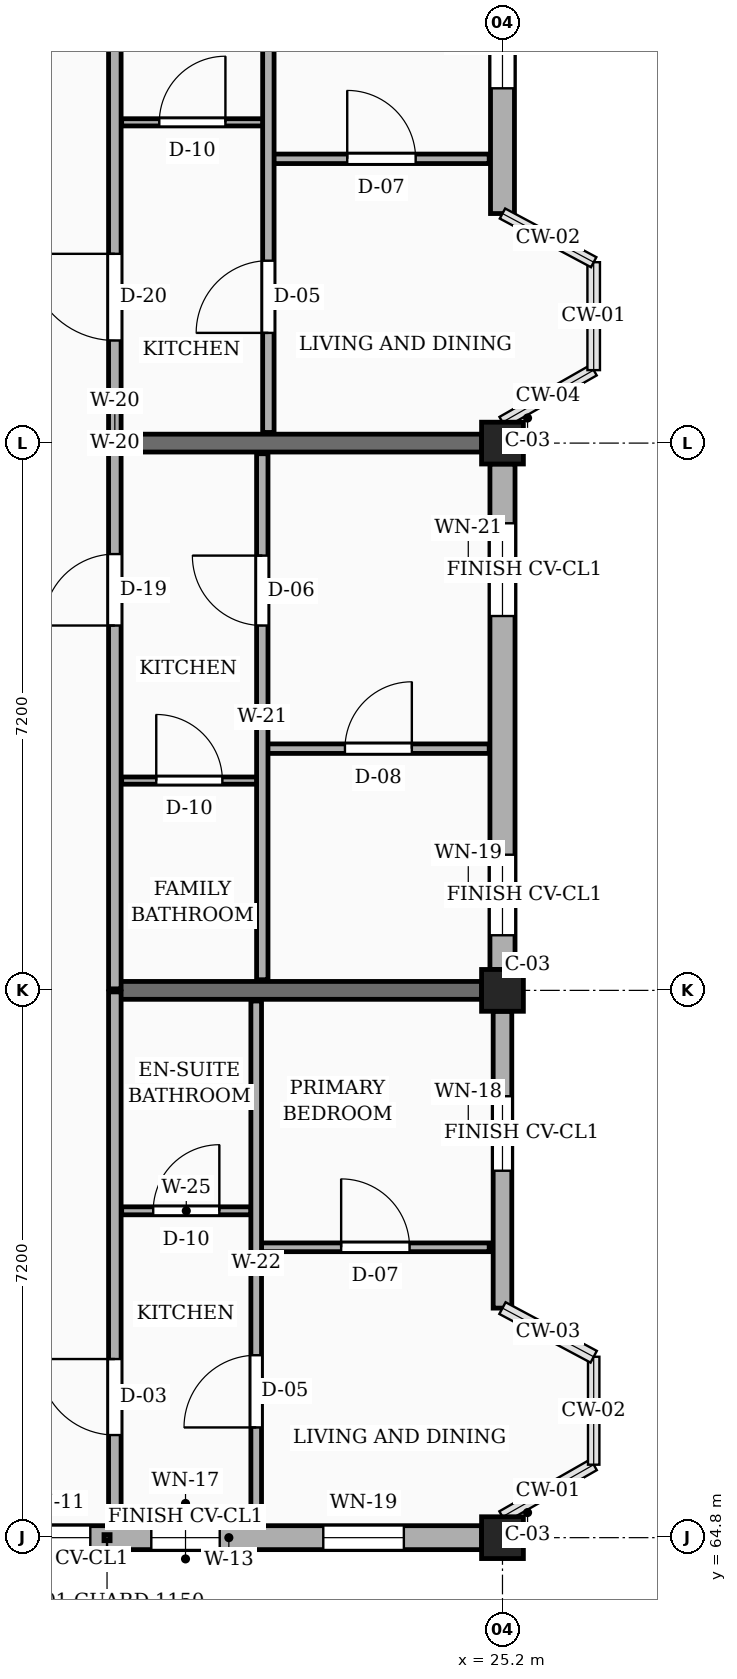
"""IFC4 building model, lengths in metres.
Left out: names, types, materials, properties, quantities, classifications, styles, units other than length and angle.
Written with IfcOpenShell. Run it as: python <this file> out.ifc"""

import sys

from ifc_helpers import new_model, si_unit, direction, frame, frame_2d, origin, origin_2d, place, context, subcontext, project, spatial, rectangle, extrude, element, fill, save


model = new_model("IFC4")
c1 = context("Model", 3, precision=1e-05, world=origin(), true_north=direction((0.0, 1.0)))
c2 = subcontext(c1, "Body", "Model", "MODEL_VIEW")
j1 = project(units=[si_unit("LENGTHUNIT", "METRE"), si_unit("PLANEANGLEUNIT", "RADIAN")], contexts=[c1])
p1 = place(None, origin())
s1 = spatial("IfcSite", under=j1, at=p1, CompositionType="ELEMENT")
p2 = place(p1, origin())
s2 = spatial("IfcBuilding", under=s1, at=p2, CompositionType="ELEMENT")
p3 = place(p2, frame((0.0, 0.0, 20.25)))
s3 = spatial("IfcBuildingStorey", under=s2, at=p3, CompositionType="ELEMENT", Elevation=20.25)
for number, where, z_axis, x_axis in (
    (1, (25.2, 64.8, 0.0), (0.0, 0.0, 1.0), (1.0, 0.0, 0.0)),
    (2, (25.2, 72.0, 0.0), (0.0, 0.0, 1.0), (1.0, 0.0, 0.0)),
    (3, (25.2, 79.2, 0.0), (0.0, 0.0, 1.0), (1.0, 0.0, 0.0)),
):
    element("IfcColumn", number, at=place(p3, frame(where, z_axis=z_axis, x_axis=x_axis)), inside=s3, PredefinedType="COLUMN", context=c2, shape_type="SweptSolid", body=[
        extrude(rectangle(XDim=0.55, YDim=0.55, at=origin_2d()), origin(), (0.0, 0.0, 1.0), 3.15),
    ])
for number, where, z_axis, x_axis in (
    (4, (20.1, 72.0, 0.0), (0.0, 0.0, 1.0), (1.0, 0.0, 0.0)),
    (5, (20.1, 79.2, 0.0), (0.0, 0.0, 1.0), (1.0, 0.0, 0.0)),
):
    element("IfcWall", number, at=place(p3, frame(where, z_axis=z_axis, x_axis=x_axis)), inside=s3, PredefinedType="SOLIDWALL", context=c2, shape_type="SweptSolid", body=[
        extrude(rectangle(XDim=4.825, YDim=0.235, at=frame_2d((2.413, 0.0))), origin(), (0.0, 0.0, 1.0), 2.21),
    ])
p4 = place(p3, frame((18.275, 64.8, 0.0), z_axis=(0.0, 0.0, 1.0), x_axis=(1.0, 0.0, 0.0)))
e6 = element("IfcWall", 6, at=p4, inside=s3, PredefinedType="SOLIDWALL", context=c2, shape_type="SweptSolid", body=[
    extrude(rectangle(XDim=6.65, YDim=0.315, at=frame_2d((3.325, 0.0))), origin(), (0.0, 0.0, 1.0), 2.48),
])
p5 = place(p4, frame((0.462, 0.0, 0.78)))
e7 = element("IfcOpeningElement", 7, at=p5, cuts=e6, PredefinedType="OPENING", context=c2, shape_type="SweptSolid", body=[
    extrude(rectangle(XDim=1.04, YDim=1.26, at=frame_2d((0.52, 0.63))), frame((0.0, 0.167, 0.0), z_axis=(0.0, -1.0, 0.0), x_axis=(1.0, 0.0, 0.0)), (0.0, 0.0, 1.0), 0.335),
])
p6 = place(p4, frame((2.305, 0.0, 0.78)))
e8 = element("IfcOpeningElement", 8, at=p6, cuts=e6, PredefinedType="OPENING", context=c2, shape_type="SweptSolid", body=[
    extrude(rectangle(XDim=0.9, YDim=1.36, at=frame_2d((0.45, 0.68))), frame((0.0, 0.167, 0.0), z_axis=(0.0, -1.0, 0.0), x_axis=(1.0, 0.0, 0.0)), (0.0, 0.0, 1.0), 0.335),
])
p7 = place(p4, frame((4.567, 0.0, 0.78)))
e9 = element("IfcOpeningElement", 9, at=p7, cuts=e6, PredefinedType="OPENING", context=c2, shape_type="SweptSolid", body=[
    extrude(rectangle(XDim=1.06, YDim=1.36, at=frame_2d((0.53, 0.68))), frame((0.0, 0.167, 0.0), z_axis=(0.0, -1.0, 0.0), x_axis=(1.0, 0.0, 0.0)), (0.0, 0.0, 1.0), 0.335),
])
p8 = place(p3, frame((25.2, 67.82, 0.0), z_axis=(0.0, 0.0, 1.0), x_axis=(0.0, 1.0, 0.0)))
e10 = element("IfcWall", 10, at=p8, inside=s3, PredefinedType="SOLIDWALL", context=c2, shape_type="SweptSolid", body=[
    extrude(rectangle(XDim=3.905, YDim=0.245, at=frame_2d((1.953, 0.0))), origin(), (0.0, 0.0, 1.0), 2.48),
])
p9 = place(p8, frame((1.808, 0.0, 0.78)))
e11 = element("IfcOpeningElement", 11, at=p9, cuts=e10, PredefinedType="OPENING", context=c2, shape_type="SweptSolid", body=[
    extrude(rectangle(XDim=0.98, YDim=1.36, at=frame_2d((0.49, 0.68))), frame((0.0, 0.133, 0.0), z_axis=(0.0, -1.0, 0.0), x_axis=(1.0, 0.0, 0.0)), (0.0, 0.0, 1.0), 0.265),
])
p10 = place(p3, frame((25.2, 72.275, 0.0), z_axis=(0.0, 0.0, 1.0), x_axis=(0.0, 1.0, 0.0)))
e12 = element("IfcWall", 12, at=p10, inside=s3, PredefinedType="SOLIDWALL", context=c2, shape_type="SweptSolid", body=[
    extrude(rectangle(XDim=6.65, YDim=0.33, at=frame_2d((3.325, 0.0))), origin(), (0.0, 0.0, 1.0), 2.48),
])
p11 = place(p10, frame((0.45, 0.0, 0.78)))
e13 = element("IfcOpeningElement", 13, at=p11, cuts=e12, PredefinedType="OPENING", context=c2, shape_type="SweptSolid", body=[
    extrude(rectangle(XDim=1.06, YDim=1.36, at=frame_2d((0.53, 0.68))), frame((0.0, 0.175, 0.0), z_axis=(0.0, -1.0, 0.0), x_axis=(1.0, 0.0, 0.0)), (0.0, 0.0, 1.0), 0.35),
])
p12 = place(p10, frame((4.65, 0.0, 0.78)))
e14 = element("IfcOpeningElement", 14, at=p12, cuts=e12, PredefinedType="OPENING", context=c2, shape_type="SweptSolid", body=[
    extrude(rectangle(XDim=1.22, YDim=1.36, at=frame_2d((0.61, 0.68))), frame((0.0, 0.175, 0.0), z_axis=(0.0, -1.0, 0.0), x_axis=(1.0, 0.0, 0.0)), (0.0, 0.0, 1.0), 0.35),
])
p13 = place(p3, frame((25.2, 82.22, 0.0), z_axis=(0.0, 0.0, 1.0), x_axis=(0.0, 1.0, 0.0)))
e15 = element("IfcWall", 15, at=p13, inside=s3, PredefinedType="SOLIDWALL", context=c2, shape_type="SweptSolid", body=[
    extrude(rectangle(XDim=3.905, YDim=0.315, at=frame_2d((1.953, 0.0))), origin(), (0.0, 0.0, 1.0), 2.48),
])
p14 = place(p13, frame((1.647, 0.0, 0.78)))
e16 = element("IfcOpeningElement", 16, at=p14, cuts=e15, PredefinedType="OPENING", context=c2, shape_type="SweptSolid", body=[
    extrude(rectangle(XDim=1.22, YDim=1.36, at=frame_2d((0.61, 0.68))), frame((0.0, 0.167, 0.0), z_axis=(0.0, -1.0, 0.0), x_axis=(1.0, 0.0, 0.0)), (0.0, 0.0, 1.0), 0.335),
])
p15 = place(p3, frame((20.1, 64.975, 0.0), z_axis=(0.0, 0.0, 1.0), x_axis=(0.0, 1.0, 0.0)))
e17 = element("IfcWall", 17, at=p15, inside=s3, PredefinedType="PARTITIONING", context=c2, shape_type="SweptSolid", body=[
    extrude(rectangle(XDim=7.005, YDim=0.165, at=frame_2d((3.502, 0.0))), origin(), (0.0, 0.0, 1.0), 2.345),
])
p16 = place(p15, frame((1.175, 0.0, 0.0)))
e18 = element("IfcOpeningElement", 18, at=p16, cuts=e17, PredefinedType="OPENING", context=c2, shape_type="SweptSolid", body=[
    extrude(rectangle(XDim=1.0, YDim=2.15, at=frame_2d((0.5, 1.075))), frame((0.0, 0.093, 0.0), z_axis=(0.0, -1.0, 0.0), x_axis=(1.0, 0.0, 0.0)), (0.0, 0.0, 1.0), 0.185),
])
p17 = place(p3, frame((20.1, 72.02, 0.0), z_axis=(0.0, 0.0, 1.0), x_axis=(0.0, 1.0, 0.0)))
e19 = element("IfcWall", 19, at=p17, inside=s3, PredefinedType="PARTITIONING", context=c2, shape_type="SweptSolid", body=[
    extrude(rectangle(XDim=7.16, YDim=0.165, at=frame_2d((3.58, 0.0))), origin(), (0.0, 0.0, 1.0), 2.345),
])
p18 = place(p17, frame((4.78, 0.0, 0.0)))
e20 = element("IfcOpeningElement", 20, at=p18, cuts=e19, PredefinedType="OPENING", context=c2, shape_type="SweptSolid", body=[
    extrude(rectangle(XDim=0.94, YDim=2.12, at=frame_2d((0.47, 1.06))), frame((0.0, 0.093, 0.0), z_axis=(0.0, -1.0, 0.0), x_axis=(1.0, 0.0, 0.0)), (0.0, 0.0, 1.0), 0.185),
])
p19 = place(p3, frame((20.1, 79.22, 0.0), z_axis=(0.0, 0.0, 1.0), x_axis=(0.0, 1.0, 0.0)))
e21 = element("IfcWall", 21, at=p19, inside=s3, PredefinedType="PARTITIONING", context=c2, shape_type="SweptSolid", body=[
    extrude(rectangle(XDim=7.16, YDim=0.165, at=frame_2d((3.58, 0.0))), origin(), (0.0, 0.0, 1.0), 2.345),
])
p20 = place(p19, frame((1.33, 0.0, 0.0)))
e22 = element("IfcOpeningElement", 22, at=p20, cuts=e21, PredefinedType="OPENING", context=c2, shape_type="SweptSolid", body=[
    extrude(rectangle(XDim=1.14, YDim=2.18, at=frame_2d((0.57, 1.09))), frame((0.0, 0.093, 0.0), z_axis=(0.0, -1.0, 0.0), x_axis=(1.0, 0.0, 0.0)), (0.0, 0.0, 1.0), 0.185),
])
p21 = place(p3, frame((22.03, 68.62, 0.0), z_axis=(0.0, 0.0, 1.0), x_axis=(1.0, 0.0, 0.0)))
e23 = element("IfcWall", 23, at=p21, inside=s3, PredefinedType="PARTITIONING", context=c2, shape_type="SweptSolid", body=[
    extrude(rectangle(XDim=2.995, YDim=0.115, at=frame_2d((1.498, 0.0))), origin(), (0.0, 0.0, 1.0), 2.345),
])
p22 = place(p21, frame((1.048, 0.0, 0.0)))
e24 = element("IfcOpeningElement", 24, at=p22, cuts=e23, PredefinedType="OPENING", context=c2, shape_type="SweptSolid", body=[
    extrude(rectangle(XDim=0.9, YDim=2.1, at=frame_2d((0.45, 1.05))), frame((0.0, 0.067, 0.0), z_axis=(0.0, -1.0, 0.0), x_axis=(1.0, 0.0, 0.0)), (0.0, 0.0, 1.0), 0.135),
])
p23 = place(p3, frame((20.19, 69.1, 0.0), z_axis=(0.0, 0.0, 1.0), x_axis=(1.0, 0.0, 0.0)))
e25 = element("IfcWall", 25, at=p23, inside=s3, PredefinedType="PARTITIONING", context=c2, shape_type="SweptSolid", body=[
    extrude(rectangle(XDim=1.7, YDim=0.105, at=frame_2d((0.85, 0.0))), origin(), (0.0, 0.0, 1.0), 2.345),
])
p24 = place(p23, frame((0.415, 0.0, 0.0)))
e26 = element("IfcOpeningElement", 26, at=p24, cuts=e25, PredefinedType="OPENING", context=c2, shape_type="SweptSolid", body=[
    extrude(rectangle(XDim=0.87, YDim=2.05, at=frame_2d((0.435, 1.025))), frame((0.0, 0.062, 0.0), z_axis=(0.0, -1.0, 0.0), x_axis=(1.0, 0.0, 0.0)), (0.0, 0.0, 1.0), 0.125),
])
p25 = place(p3, frame((21.96, 64.975, 0.0), z_axis=(0.0, 0.0, 1.0), x_axis=(0.0, 1.0, 0.0)))
e27 = element("IfcWall", 27, at=p25, inside=s3, PredefinedType="PARTITIONING", context=c2, shape_type="SweptSolid", body=[
    extrude(rectangle(XDim=6.885, YDim=0.14, at=frame_2d((3.442, 0.0))), origin(), (0.0, 0.0, 1.0), 2.345),
])
p26 = place(p25, frame((1.275, 0.0, 0.0)))
e28 = element("IfcOpeningElement", 28, at=p26, cuts=e27, PredefinedType="OPENING", context=c2, shape_type="SweptSolid", body=[
    extrude(rectangle(XDim=0.95, YDim=2.1, at=frame_2d((0.475, 1.05))), frame((0.0, 0.08, 0.0), z_axis=(0.0, -1.0, 0.0), x_axis=(1.0, 0.0, 0.0)), (0.0, 0.0, 1.0), 0.16),
])
p27 = place(p3, frame((22.11, 75.18, 0.0), z_axis=(0.0, 0.0, 1.0), x_axis=(1.0, 0.0, 0.0)))
e29 = element("IfcWall", 29, at=p27, inside=s3, PredefinedType="PARTITIONING", context=c2, shape_type="SweptSolid", body=[
    extrude(rectangle(XDim=2.915, YDim=0.125, at=frame_2d((1.458, 0.0))), origin(), (0.0, 0.0, 1.0), 2.345),
])
p28 = place(p27, frame((1.018, 0.0, 0.0)))
e30 = element("IfcOpeningElement", 30, at=p28, cuts=e29, PredefinedType="OPENING", context=c2, shape_type="SweptSolid", body=[
    extrude(rectangle(XDim=0.88, YDim=2.08, at=frame_2d((0.44, 1.04))), frame((0.0, 0.073, 0.0), z_axis=(0.0, -1.0, 0.0), x_axis=(1.0, 0.0, 0.0)), (0.0, 0.0, 1.0), 0.145),
])
p29 = place(p3, frame((20.19, 74.76, 0.0), z_axis=(0.0, 0.0, 1.0), x_axis=(1.0, 0.0, 0.0)))
e31 = element("IfcWall", 31, at=p29, inside=s3, PredefinedType="PARTITIONING", context=c2, shape_type="SweptSolid", body=[
    extrude(rectangle(XDim=1.78, YDim=0.095, at=frame_2d((0.89, 0.0))), origin(), (0.0, 0.0, 1.0), 2.345),
])
p30 = place(p29, frame((0.455, 0.0, 0.0)))
e32 = element("IfcOpeningElement", 32, at=p30, cuts=e31, PredefinedType="OPENING", context=c2, shape_type="SweptSolid", body=[
    extrude(rectangle(XDim=0.87, YDim=2.05, at=frame_2d((0.435, 1.025))), frame((0.0, 0.058, 0.0), z_axis=(0.0, -1.0, 0.0), x_axis=(1.0, 0.0, 0.0)), (0.0, 0.0, 1.0), 0.115),
])
p31 = place(p3, frame((22.04, 72.14, 0.0), z_axis=(0.0, 0.0, 1.0), x_axis=(0.0, 1.0, 0.0)))
e33 = element("IfcWall", 33, at=p31, inside=s3, PredefinedType="PARTITIONING", context=c2, shape_type="SweptSolid", body=[
    extrude(rectangle(XDim=6.92, YDim=0.15, at=frame_2d((3.46, 0.0))), origin(), (0.0, 0.0, 1.0), 2.345),
])
p32 = place(p31, frame((4.66, 0.0, 0.0)))
e34 = element("IfcOpeningElement", 34, at=p32, cuts=e33, PredefinedType="OPENING", context=c2, shape_type="SweptSolid", body=[
    extrude(rectangle(XDim=0.92, YDim=2.1, at=frame_2d((0.46, 1.05))), frame((0.0, 0.085, 0.0), z_axis=(0.0, -1.0, 0.0), x_axis=(1.0, 0.0, 0.0)), (0.0, 0.0, 1.0), 0.17),
])
p33 = place(p3, frame((22.19, 82.94, 0.0), z_axis=(0.0, 0.0, 1.0), x_axis=(1.0, 0.0, 0.0)))
e35 = element("IfcWall", 35, at=p33, inside=s3, PredefinedType="PARTITIONING", context=c2, shape_type="SweptSolid", body=[
    extrude(rectangle(XDim=2.835, YDim=0.125, at=frame_2d((1.417, 0.0))), origin(), (0.0, 0.0, 1.0), 2.345),
])
p34 = place(p33, frame((0.968, 0.0, 0.0)))
e36 = element("IfcOpeningElement", 36, at=p34, cuts=e35, PredefinedType="OPENING", context=c2, shape_type="SweptSolid", body=[
    extrude(rectangle(XDim=0.9, YDim=2.1, at=frame_2d((0.45, 1.05))), frame((0.0, 0.073, 0.0), z_axis=(0.0, -1.0, 0.0), x_axis=(1.0, 0.0, 0.0)), (0.0, 0.0, 1.0), 0.145),
])
p35 = place(p3, frame((20.19, 83.42, 0.0), z_axis=(0.0, 0.0, 1.0), x_axis=(1.0, 0.0, 0.0)))
e37 = element("IfcWall", 37, at=p35, inside=s3, PredefinedType="PARTITIONING", context=c2, shape_type="SweptSolid", body=[
    extrude(rectangle(XDim=1.86, YDim=0.095, at=frame_2d((0.93, 0.0))), origin(), (0.0, 0.0, 1.0), 2.345),
])
p36 = place(p35, frame((0.495, 0.0, 0.0)))
e38 = element("IfcOpeningElement", 38, at=p36, cuts=e37, PredefinedType="OPENING", context=c2, shape_type="SweptSolid", body=[
    extrude(rectangle(XDim=0.87, YDim=2.05, at=frame_2d((0.435, 1.025))), frame((0.0, 0.058, 0.0), z_axis=(0.0, -1.0, 0.0), x_axis=(1.0, 0.0, 0.0)), (0.0, 0.0, 1.0), 0.115),
])
p37 = place(p3, frame((22.12, 79.34, 0.0), z_axis=(0.0, 0.0, 1.0), x_axis=(0.0, 1.0, 0.0)))
e39 = element("IfcWall", 39, at=p37, inside=s3, PredefinedType="PARTITIONING", context=c2, shape_type="SweptSolid", body=[
    extrude(rectangle(XDim=6.92, YDim=0.15, at=frame_2d((3.46, 0.0))), origin(), (0.0, 0.0, 1.0), 2.345),
])
p38 = place(p37, frame((1.31, 0.0, 0.0)))
e40 = element("IfcOpeningElement", 40, at=p38, cuts=e39, PredefinedType="OPENING", context=c2, shape_type="SweptSolid", body=[
    extrude(rectangle(XDim=0.95, YDim=2.1, at=frame_2d((0.475, 1.05))), frame((0.0, 0.085, 0.0), z_axis=(0.0, -1.0, 0.0), x_axis=(1.0, 0.0, 0.0)), (0.0, 0.0, 1.0), 0.17),
])
p39 = place(p5, origin())
e41 = element("IfcWindow", 41, at=p39, inside=s3, PartitioningType="SINGLE_PANEL", PredefinedType="WINDOW", context=c2, shape_type="SweptSolid", body=[
    extrude(rectangle(XDim=1.04, YDim=1.26, at=frame_2d((0.52, 0.63))), frame((0.0, 0.03, 0.0), z_axis=(0.0, -1.0, 0.0), x_axis=(1.0, 0.0, 0.0)), (0.0, 0.0, 1.0), 0.06),
])
fill(e7, e41)
p40 = place(p6, origin())
e42 = element("IfcWindow", 42, at=p40, inside=s3, PartitioningType="SINGLE_PANEL", PredefinedType="WINDOW", context=c2, shape_type="SweptSolid", body=[
    extrude(rectangle(XDim=0.9, YDim=1.36, at=frame_2d((0.45, 0.68))), frame((0.0, 0.03, 0.0), z_axis=(0.0, -1.0, 0.0), x_axis=(1.0, 0.0, 0.0)), (0.0, 0.0, 1.0), 0.06),
])
fill(e8, e42)
p41 = place(p7, origin())
e43 = element("IfcWindow", 43, at=p41, inside=s3, PartitioningType="SINGLE_PANEL", PredefinedType="WINDOW", context=c2, shape_type="SweptSolid", body=[
    extrude(rectangle(XDim=1.06, YDim=1.36, at=frame_2d((0.53, 0.68))), frame((0.0, 0.03, 0.0), z_axis=(0.0, -1.0, 0.0), x_axis=(1.0, 0.0, 0.0)), (0.0, 0.0, 1.0), 0.06),
])
fill(e9, e43)
p42 = place(p9, origin())
e44 = element("IfcWindow", 44, at=p42, inside=s3, PartitioningType="SINGLE_PANEL", PredefinedType="WINDOW", context=c2, shape_type="SweptSolid", body=[
    extrude(rectangle(XDim=0.98, YDim=1.36, at=frame_2d((0.49, 0.68))), frame((0.0, 0.03, 0.0), z_axis=(0.0, -1.0, 0.0), x_axis=(1.0, 0.0, 0.0)), (0.0, 0.0, 1.0), 0.06),
])
fill(e11, e44)
p43 = place(p11, origin())
e45 = element("IfcWindow", 45, at=p43, inside=s3, PartitioningType="SINGLE_PANEL", PredefinedType="WINDOW", context=c2, shape_type="SweptSolid", body=[
    extrude(rectangle(XDim=1.06, YDim=1.36, at=frame_2d((0.53, 0.68))), frame((0.0, 0.03, 0.0), z_axis=(0.0, -1.0, 0.0), x_axis=(1.0, 0.0, 0.0)), (0.0, 0.0, 1.0), 0.06),
])
fill(e13, e45)
p44 = place(p12, origin())
e46 = element("IfcWindow", 46, at=p44, inside=s3, PartitioningType="SINGLE_PANEL", PredefinedType="WINDOW", context=c2, shape_type="SweptSolid", body=[
    extrude(rectangle(XDim=1.22, YDim=1.36, at=frame_2d((0.61, 0.68))), frame((0.0, 0.03, 0.0), z_axis=(0.0, -1.0, 0.0), x_axis=(1.0, 0.0, 0.0)), (0.0, 0.0, 1.0), 0.06),
])
fill(e14, e46)
p45 = place(p14, origin())
e47 = element("IfcWindow", 47, at=p45, inside=s3, PartitioningType="SINGLE_PANEL", PredefinedType="WINDOW", context=c2, shape_type="SweptSolid", body=[
    extrude(rectangle(XDim=1.22, YDim=1.36, at=frame_2d((0.61, 0.68))), frame((0.0, 0.03, 0.0), z_axis=(0.0, -1.0, 0.0), x_axis=(1.0, 0.0, 0.0)), (0.0, 0.0, 1.0), 0.06),
])
fill(e16, e47)
p46 = place(p16, origin())
e48 = element("IfcDoor", 48, at=p46, inside=s3, OperationType="SINGLE_SWING_RIGHT", PredefinedType="DOOR", context=c2, shape_type="SweptSolid", body=[
    extrude(rectangle(XDim=1.0, YDim=2.15, at=frame_2d((0.5, 1.075))), frame((0.0, 0.025, 0.0), z_axis=(0.0, -1.0, 0.0), x_axis=(1.0, 0.0, 0.0)), (0.0, 0.0, 1.0), 0.05),
])
fill(e18, e48)
p47 = place(p18, origin())
e49 = element("IfcDoor", 49, at=p47, inside=s3, OperationType="SINGLE_SWING_LEFT", PredefinedType="DOOR", context=c2, shape_type="SweptSolid", body=[
    extrude(rectangle(XDim=0.94, YDim=2.12, at=frame_2d((0.47, 1.06))), frame((0.0, 0.025, 0.0), z_axis=(0.0, -1.0, 0.0), x_axis=(1.0, 0.0, 0.0)), (0.0, 0.0, 1.0), 0.05),
])
fill(e20, e49)
p48 = place(p20, origin())
e50 = element("IfcDoor", 50, at=p48, inside=s3, OperationType="SINGLE_SWING_RIGHT", PredefinedType="DOOR", context=c2, shape_type="SweptSolid", body=[
    extrude(rectangle(XDim=1.14, YDim=2.18, at=frame_2d((0.57, 1.09))), frame((0.0, 0.025, 0.0), z_axis=(0.0, -1.0, 0.0), x_axis=(1.0, 0.0, 0.0)), (0.0, 0.0, 1.0), 0.05),
])
fill(e22, e50)
p49 = place(p22, origin())
e51 = element("IfcDoor", 51, at=p49, inside=s3, OperationType="SINGLE_SWING_LEFT", PredefinedType="DOOR", context=c2, shape_type="SweptSolid", body=[
    extrude(rectangle(XDim=0.9, YDim=2.1, at=frame_2d((0.45, 1.05))), frame((0.0, 0.025, 0.0), z_axis=(0.0, -1.0, 0.0), x_axis=(1.0, 0.0, 0.0)), (0.0, 0.0, 1.0), 0.05),
])
fill(e24, e51)
p50 = place(p24, origin())
e52 = element("IfcDoor", 52, at=p50, inside=s3, OperationType="SINGLE_SWING_RIGHT", PredefinedType="DOOR", context=c2, shape_type="SweptSolid", body=[
    extrude(rectangle(XDim=0.87, YDim=2.05, at=frame_2d((0.435, 1.025))), frame((0.0, 0.025, 0.0), z_axis=(0.0, -1.0, 0.0), x_axis=(1.0, 0.0, 0.0)), (0.0, 0.0, 1.0), 0.05),
])
fill(e26, e52)
p51 = place(p26, origin())
e53 = element("IfcDoor", 53, at=p51, inside=s3, OperationType="SINGLE_SWING_LEFT", PredefinedType="DOOR", context=c2, shape_type="SweptSolid", body=[
    extrude(rectangle(XDim=0.95, YDim=2.1, at=frame_2d((0.475, 1.05))), frame((0.0, 0.025, 0.0), z_axis=(0.0, -1.0, 0.0), x_axis=(1.0, 0.0, 0.0)), (0.0, 0.0, 1.0), 0.05),
])
fill(e28, e53)
p52 = place(p28, origin())
e54 = element("IfcDoor", 54, at=p52, inside=s3, OperationType="SINGLE_SWING_RIGHT", PredefinedType="DOOR", context=c2, shape_type="SweptSolid", body=[
    extrude(rectangle(XDim=0.88, YDim=2.08, at=frame_2d((0.44, 1.04))), frame((0.0, 0.025, 0.0), z_axis=(0.0, -1.0, 0.0), x_axis=(1.0, 0.0, 0.0)), (0.0, 0.0, 1.0), 0.05),
])
fill(e30, e54)
p53 = place(p30, origin())
e55 = element("IfcDoor", 55, at=p53, inside=s3, OperationType="SINGLE_SWING_LEFT", PredefinedType="DOOR", context=c2, shape_type="SweptSolid", body=[
    extrude(rectangle(XDim=0.87, YDim=2.05, at=frame_2d((0.435, 1.025))), frame((0.0, 0.025, 0.0), z_axis=(0.0, -1.0, 0.0), x_axis=(1.0, 0.0, 0.0)), (0.0, 0.0, 1.0), 0.05),
])
fill(e32, e55)
p54 = place(p32, origin())
e56 = element("IfcDoor", 56, at=p54, inside=s3, OperationType="SINGLE_SWING_RIGHT", PredefinedType="DOOR", context=c2, shape_type="SweptSolid", body=[
    extrude(rectangle(XDim=0.92, YDim=2.1, at=frame_2d((0.46, 1.05))), frame((0.0, 0.025, 0.0), z_axis=(0.0, -1.0, 0.0), x_axis=(1.0, 0.0, 0.0)), (0.0, 0.0, 1.0), 0.05),
])
fill(e34, e56)
p55 = place(p34, origin())
e57 = element("IfcDoor", 57, at=p55, inside=s3, OperationType="SINGLE_SWING_LEFT", PredefinedType="DOOR", context=c2, shape_type="SweptSolid", body=[
    extrude(rectangle(XDim=0.9, YDim=2.1, at=frame_2d((0.45, 1.05))), frame((0.0, 0.025, 0.0), z_axis=(0.0, -1.0, 0.0), x_axis=(1.0, 0.0, 0.0)), (0.0, 0.0, 1.0), 0.05),
])
fill(e36, e57)
p56 = place(p36, origin())
e58 = element("IfcDoor", 58, at=p56, inside=s3, OperationType="SINGLE_SWING_RIGHT", PredefinedType="DOOR", context=c2, shape_type="SweptSolid", body=[
    extrude(rectangle(XDim=0.87, YDim=2.05, at=frame_2d((0.435, 1.025))), frame((0.0, 0.025, 0.0), z_axis=(0.0, -1.0, 0.0), x_axis=(1.0, 0.0, 0.0)), (0.0, 0.0, 1.0), 0.05),
])
fill(e38, e58)
p57 = place(p38, origin())
e59 = element("IfcDoor", 59, at=p57, inside=s3, OperationType="SINGLE_SWING_LEFT", PredefinedType="DOOR", context=c2, shape_type="SweptSolid", body=[
    extrude(rectangle(XDim=0.95, YDim=2.1, at=frame_2d((0.475, 1.05))), frame((0.0, 0.025, 0.0), z_axis=(0.0, -1.0, 0.0), x_axis=(1.0, 0.0, 0.0)), (0.0, 0.0, 1.0), 0.05),
])
fill(e40, e59)
save(model, sys.argv[1])
